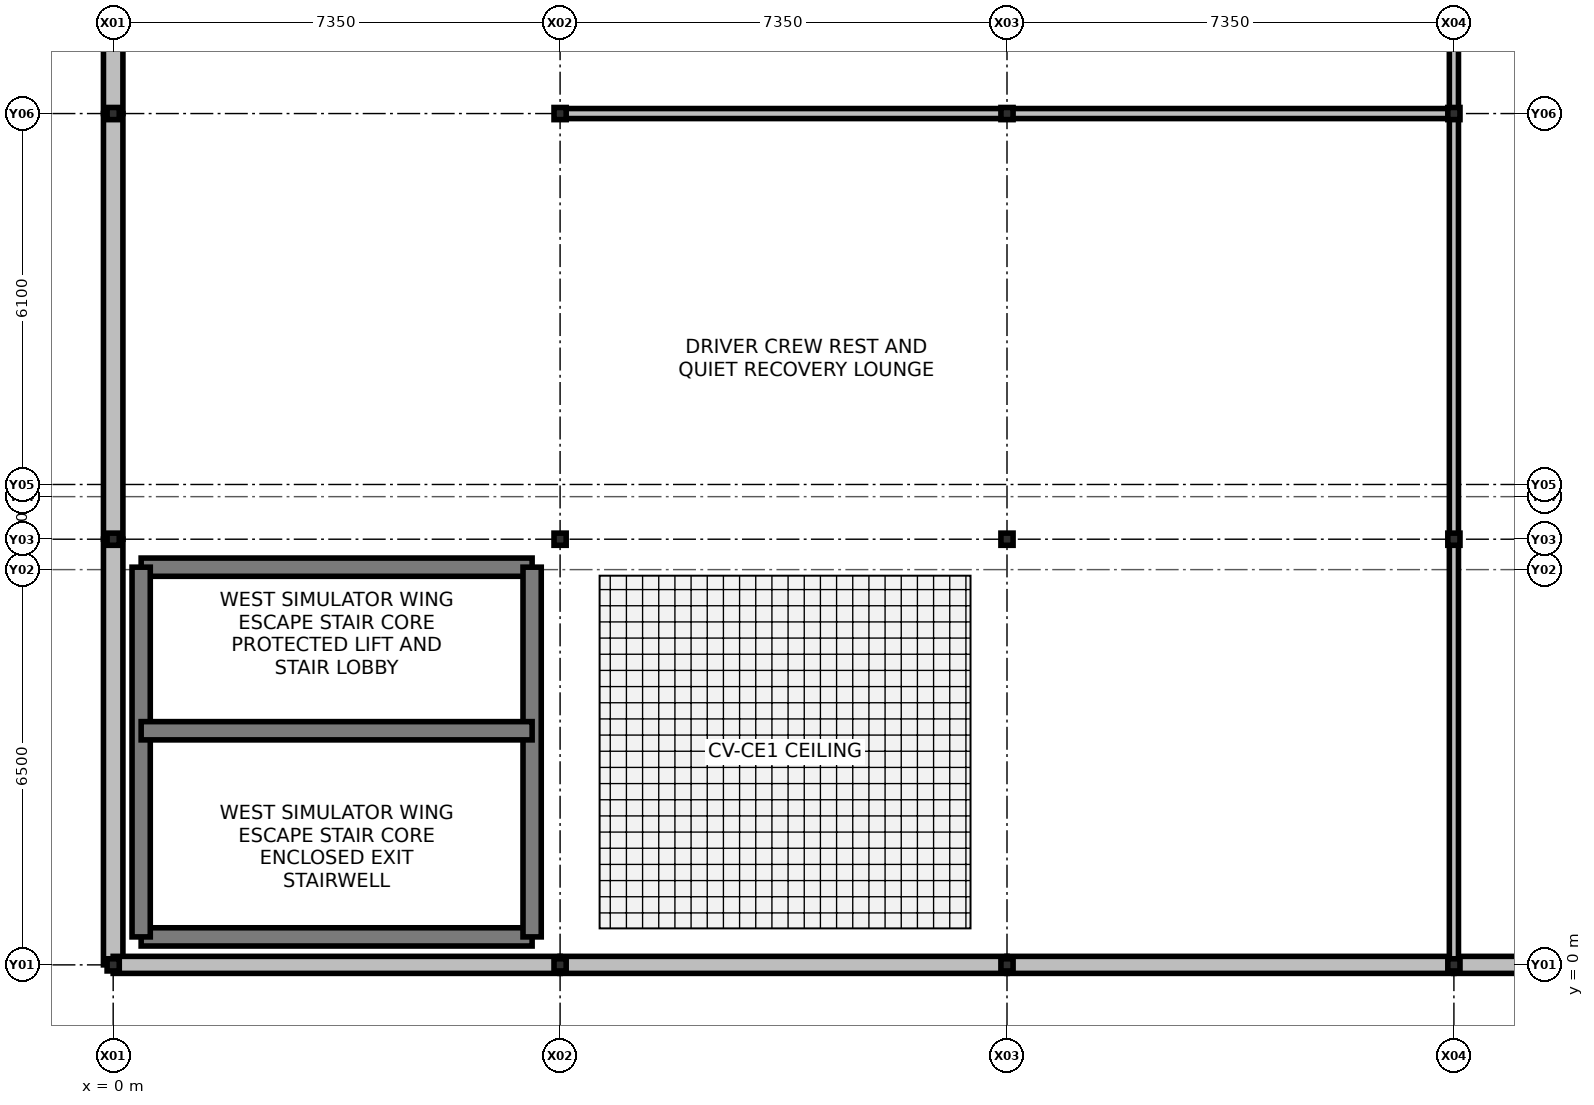
"""IFC4 building model, lengths in metres.
Left out: names, types, materials, properties, quantities, classifications, styles, units other than length and angle.
Written with IfcOpenShell. Run it as: python <this file> out.ifc"""

import sys

from ifc_helpers import new_model, si_unit, direction, frame, frame_2d, origin, origin_with_axes, origin_2d, place, context, subcontext, project, spatial, rectangle, i_section, extrude, element, fill, save


model = new_model("IFC4")
c1 = context("Model", 3, precision=1e-05, world=origin(), true_north=direction((0.0, 1.0)))
c2 = subcontext(c1, "Body", "Model", "MODEL_VIEW")
j1 = project(units=[si_unit("LENGTHUNIT", "METRE"), si_unit("PLANEANGLEUNIT", "RADIAN")], contexts=[c1])
p1 = place(None, origin())
s1 = spatial("IfcSite", under=j1, at=p1, CompositionType="ELEMENT")
p2 = place(p1, origin())
s2 = spatial("IfcBuilding", under=s1, at=p2, CompositionType="ELEMENT")
p3 = place(p2, frame((0.0, 0.0, 19.5)))
s3 = spatial("IfcBuildingStorey", under=s2, at=p3, CompositionType="ELEMENT", Elevation=19.5)
for number, where, z_axis, x_axis in (
    (1, (0.0, 0.0, 0.0), (0.0, 0.0, 1.0), (1.0, 0.0, 0.0)),
    (2, (0.0, 7.0, 0.0), (0.0, 0.0, 1.0), (1.0, 0.0, 0.0)),
    (3, (0.0, 14.0, 0.0), (0.0, 0.0, 1.0), (1.0, 0.0, 0.0)),
    (4, (7.35, 0.0, 0.0), (0.0, 0.0, 1.0), (1.0, 0.0, 0.0)),
    (5, (7.35, 7.0, 0.0), (0.0, 0.0, 1.0), (1.0, 0.0, 0.0)),
    (6, (7.35, 14.0, 0.0), (0.0, 0.0, 1.0), (1.0, 0.0, 0.0)),
    (7, (14.7, 0.0, 0.0), (0.0, 0.0, 1.0), (1.0, 0.0, 0.0)),
    (8, (14.7, 7.0, 0.0), (0.0, 0.0, 1.0), (1.0, 0.0, 0.0)),
    (9, (14.7, 14.0, 0.0), (0.0, 0.0, 1.0), (1.0, 0.0, 0.0)),
    (10, (22.05, 0.0, 0.0), (0.0, 0.0, 1.0), (1.0, 0.0, 0.0)),
    (11, (22.05, 7.0, 0.0), (0.0, 0.0, 1.0), (1.0, 0.0, 0.0)),
    (12, (22.05, 14.0, 0.0), (0.0, 0.0, 1.0), (1.0, 0.0, 0.0)),
):
    element("IfcColumn", number, at=place(p3, frame(where, z_axis=z_axis, x_axis=x_axis)), inside=s3, PredefinedType="COLUMN", context=c2, shape_type="SweptSolid", body=[
        extrude(i_section(OverallWidth=0.2, OverallDepth=0.2, WebThickness=0.008, FlangeThickness=0.012, at=origin_2d()), origin(), (0.0, 0.0, 1.0), 4.2),
    ])
p4 = place(p3, frame((0.0, 0.0, 0.0), z_axis=(0.0, 0.0, 1.0), x_axis=(0.0, 1.0, 0.0)))
e13 = element("IfcWall", 13, at=p4, inside=s3, PredefinedType="SOLIDWALL", context=c2, shape_type="SweptSolid", body=[
    extrude(rectangle(XDim=7.0, YDim=0.32, at=frame_2d((3.5, 0.0))), origin(), (0.0, 0.0, 1.0), 3.48),
])
p5 = place(p4, frame((2.2, 0.0, 0.9)))
e14 = element("IfcOpeningElement", 14, at=p5, cuts=e13, PredefinedType="OPENING", context=c2, shape_type="SweptSolid", body=[
    extrude(rectangle(XDim=2.55, YDim=1.75, at=frame_2d((1.275, 0.875))), frame((0.0, 0.17, 0.0), z_axis=(0.0, -1.0, 0.0), x_axis=(1.0, 0.0, 0.0)), (0.0, 0.0, 1.0), 0.34),
])
p6 = place(p3, frame((0.0, 7.0, 0.0), z_axis=(0.0, 0.0, 1.0), x_axis=(0.0, 1.0, 0.0)))
e15 = element("IfcWall", 15, at=p6, inside=s3, PredefinedType="SOLIDWALL", context=c2, shape_type="SweptSolid", body=[
    extrude(rectangle(XDim=7.0, YDim=0.32, at=frame_2d((3.5, 0.0))), origin(), (0.0, 0.0, 1.0), 3.48),
])
p7 = place(p6, frame((2.2, 0.0, 0.9)))
e16 = element("IfcOpeningElement", 16, at=p7, cuts=e15, PredefinedType="OPENING", context=c2, shape_type="SweptSolid", body=[
    extrude(rectangle(XDim=3.3, YDim=2.1, at=frame_2d((1.65, 1.05))), frame((0.0, 0.17, 0.0), z_axis=(0.0, -1.0, 0.0), x_axis=(1.0, 0.0, 0.0)), (0.0, 0.0, 1.0), 0.34),
])
p8 = place(p3, frame((0.0, 14.0, 0.0), z_axis=(0.0, 0.0, 1.0), x_axis=(0.0, 1.0, 0.0)))
e17 = element("IfcWall", 17, at=p8, inside=s3, PredefinedType="SOLIDWALL", context=c2, shape_type="SweptSolid", body=[
    extrude(rectangle(XDim=7.0, YDim=0.32, at=frame_2d((3.5, 0.0))), origin(), (0.0, 0.0, 1.0), 3.48),
])
p9 = place(p8, frame((2.2, 0.0, 0.9)))
e18 = element("IfcOpeningElement", 18, at=p9, cuts=e17, PredefinedType="OPENING", context=c2, shape_type="SweptSolid", body=[
    extrude(rectangle(XDim=1.5, YDim=1.8, at=frame_2d((0.75, 0.9))), frame((0.0, 0.17, 0.0), z_axis=(0.0, -1.0, 0.0), x_axis=(1.0, 0.0, 0.0)), (0.0, 0.0, 1.0), 0.34),
])
p10 = place(p3, origin_with_axes())
e19 = element("IfcWall", 19, at=p10, inside=s3, PredefinedType="SOLIDWALL", context=c2, shape_type="SweptSolid", body=[
    extrude(rectangle(XDim=7.35, YDim=0.28, at=frame_2d((3.675, 0.0))), origin(), (0.0, 0.0, 1.0), 3.48),
])
p11 = place(p10, frame((2.4, 0.0, 0.9)))
e20 = element("IfcOpeningElement", 20, at=p11, cuts=e19, PredefinedType="OPENING", context=c2, shape_type="SweptSolid", body=[
    extrude(rectangle(XDim=2.6, YDim=2.0, at=frame_2d((1.3, 1.0))), frame((0.0, 0.15, 0.0), z_axis=(0.0, -1.0, 0.0), x_axis=(1.0, 0.0, 0.0)), (0.0, 0.0, 1.0), 0.3),
])
p12 = place(p3, frame((7.35, 0.0, 0.0), z_axis=(0.0, 0.0, 1.0), x_axis=(1.0, 0.0, 0.0)))
e21 = element("IfcWall", 21, at=p12, inside=s3, PredefinedType="SOLIDWALL", context=c2, shape_type="SweptSolid", body=[
    extrude(rectangle(XDim=7.35, YDim=0.28, at=frame_2d((3.675, 0.0))), origin(), (0.0, 0.0, 1.0), 3.48),
])
p13 = place(p12, frame((2.4, 0.0, 0.9)))
e22 = element("IfcOpeningElement", 22, at=p13, cuts=e21, PredefinedType="OPENING", context=c2, shape_type="SweptSolid", body=[
    extrude(rectangle(XDim=2.8, YDim=2.1, at=frame_2d((1.4, 1.05))), frame((0.0, 0.15, 0.0), z_axis=(0.0, -1.0, 0.0), x_axis=(1.0, 0.0, 0.0)), (0.0, 0.0, 1.0), 0.3),
])
p14 = place(p3, frame((14.7, 0.0, 0.0), z_axis=(0.0, 0.0, 1.0), x_axis=(1.0, 0.0, 0.0)))
e23 = element("IfcWall", 23, at=p14, inside=s3, PredefinedType="SOLIDWALL", context=c2, shape_type="SweptSolid", body=[
    extrude(rectangle(XDim=7.35, YDim=0.28, at=frame_2d((3.675, 0.0))), origin(), (0.0, 0.0, 1.0), 3.48),
])
p15 = place(p14, frame((2.4, 0.0, 0.9)))
e24 = element("IfcOpeningElement", 24, at=p15, cuts=e23, PredefinedType="OPENING", context=c2, shape_type="SweptSolid", body=[
    extrude(rectangle(XDim=3.0, YDim=1.8, at=frame_2d((1.5, 0.9))), frame((0.0, 0.15, 0.0), z_axis=(0.0, -1.0, 0.0), x_axis=(1.0, 0.0, 0.0)), (0.0, 0.0, 1.0), 0.3),
])
p16 = place(p3, frame((22.05, 0.0, 0.0), z_axis=(0.0, 0.0, 1.0), x_axis=(1.0, 0.0, 0.0)))
e25 = element("IfcWall", 25, at=p16, inside=s3, PredefinedType="SOLIDWALL", context=c2, shape_type="SweptSolid", body=[
    extrude(rectangle(XDim=7.35, YDim=0.28, at=frame_2d((3.675, 0.0))), origin(), (0.0, 0.0, 1.0), 3.48),
])
p17 = place(p16, frame((2.4, 0.0, 0.9)))
e26 = element("IfcOpeningElement", 26, at=p17, cuts=e25, PredefinedType="OPENING", context=c2, shape_type="SweptSolid", body=[
    extrude(rectangle(XDim=3.0, YDim=2.2, at=frame_2d((1.5, 1.1))), frame((0.0, 0.15, 0.0), z_axis=(0.0, -1.0, 0.0), x_axis=(1.0, 0.0, 0.0)), (0.0, 0.0, 1.0), 0.3),
])
p18 = place(p3, frame((0.46, 0.46, 0.0), z_axis=(0.0, 0.0, 1.0), x_axis=(1.0, 0.0, 0.0)))
e27 = element("IfcWall", 27, at=p18, inside=s3, PredefinedType="SHEAR", context=c2, shape_type="SweptSolid", body=[
    extrude(rectangle(XDim=6.43, YDim=0.3, at=frame_2d((3.215, 0.0))), origin(), (0.0, 0.0, 1.0), 3.92),
])
p19 = place(p3, frame((0.46, 6.54, 0.0), z_axis=(0.0, 0.0, 1.0), x_axis=(1.0, 0.0, 0.0)))
e28 = element("IfcWall", 28, at=p19, inside=s3, PredefinedType="SHEAR", context=c2, shape_type="SweptSolid", body=[
    extrude(rectangle(XDim=6.43, YDim=0.3, at=frame_2d((3.215, 0.0))), origin(), (0.0, 0.0, 1.0), 3.92),
])
p20 = place(p19, frame((0.55, 0.0, 0.0)))
e29 = element("IfcOpeningElement", 29, at=p20, cuts=e28, PredefinedType="OPENING", context=c2, shape_type="SweptSolid", body=[
    extrude(rectangle(XDim=1.5, YDim=2.2, at=frame_2d((0.75, 1.1))), frame((0.0, 0.16, 0.0), z_axis=(0.0, -1.0, 0.0), x_axis=(1.0, 0.0, 0.0)), (0.0, 0.0, 1.0), 0.32),
])
for number, where, z_axis, x_axis in (
    (30, (0.46, 0.46, 0.0), (0.0, 0.0, 1.0), (0.0, 1.0, 0.0)),
    (31, (6.89, 0.46, 0.0), (0.0, 0.0, 1.0), (0.0, 1.0, 0.0)),
):
    element("IfcWall", number, at=place(p3, frame(where, z_axis=z_axis, x_axis=x_axis)), inside=s3, PredefinedType="SHEAR", context=c2, shape_type="SweptSolid", body=[
        extrude(rectangle(XDim=6.08, YDim=0.3, at=frame_2d((3.04, 0.0))), origin(), (0.0, 0.0, 1.0), 3.92),
    ])
p21 = place(p3, frame((0.46, 3.85, 0.0), z_axis=(0.0, 0.0, 1.0), x_axis=(1.0, 0.0, 0.0)))
e32 = element("IfcWall", 32, at=p21, inside=s3, PredefinedType="SHEAR", context=c2, shape_type="SweptSolid", body=[
    extrude(rectangle(XDim=6.43, YDim=0.3, at=frame_2d((3.215, 0.0))), origin(), (0.0, 0.0, 1.0), 3.92),
])
p22 = place(p21, frame((0.185, 0.0, 0.0)))
e33 = element("IfcOpeningElement", 33, at=p22, cuts=e32, PredefinedType="OPENING", context=c2, shape_type="SweptSolid", body=[
    extrude(rectangle(XDim=1.05, YDim=2.15, at=frame_2d((0.525, 1.075))), frame((0.0, 0.16, 0.0), z_axis=(0.0, -1.0, 0.0), x_axis=(1.0, 0.0, 0.0)), (0.0, 0.0, 1.0), 0.32),
])
p23 = place(p3, frame((7.35, 14.0, 0.0), z_axis=(0.0, 0.0, 1.0), x_axis=(1.0, 0.0, 0.0)))
e34 = element("IfcWall", 34, at=p23, inside=s3, PredefinedType="PARTITIONING", context=c2, shape_type="SweptSolid", body=[
    extrude(rectangle(XDim=14.7, YDim=0.165, at=frame_2d((7.35, 0.0))), origin(), (0.0, 0.0, 1.0), 3.25),
])
p24 = place(p23, frame((4.0, 0.0, 0.0)))
e35 = element("IfcOpeningElement", 35, at=p24, cuts=e34, PredefinedType="OPENING", context=c2, shape_type="SweptSolid", body=[
    extrude(rectangle(XDim=1.05, YDim=2.1, at=frame_2d((0.525, 1.05))), frame((0.0, 0.092, 0.0), z_axis=(0.0, -1.0, 0.0), x_axis=(1.0, 0.0, 0.0)), (0.0, 0.0, 1.0), 0.185),
])
p25 = place(p3, frame((22.05, 0.0, 0.0), z_axis=(0.0, 0.0, 1.0), x_axis=(0.0, 1.0, 0.0)))
e36 = element("IfcWall", 36, at=p25, inside=s3, PredefinedType="PARTITIONING", context=c2, shape_type="SweptSolid", body=[
    extrude(rectangle(XDim=28.0, YDim=0.15, at=frame_2d((14.0, 0.0))), origin(), (0.0, 0.0, 1.0), 3.25),
])
p26 = place(p25, frame((4.0, 0.0, 0.0)))
e37 = element("IfcOpeningElement", 37, at=p26, cuts=e36, PredefinedType="OPENING", context=c2, shape_type="SweptSolid", body=[
    extrude(rectangle(XDim=1.2, YDim=2.1, at=frame_2d((0.6, 1.05))), frame((0.0, 0.085, 0.0), z_axis=(0.0, -1.0, 0.0), x_axis=(1.0, 0.0, 0.0)), (0.0, 0.0, 1.0), 0.17),
])
p27 = place(p25, frame((24.0, 0.0, 0.0)))
e38 = element("IfcOpeningElement", 38, at=p27, cuts=e36, PredefinedType="OPENING", context=c2, shape_type="SweptSolid", body=[
    extrude(rectangle(XDim=1.1, YDim=2.1, at=frame_2d((0.55, 1.05))), frame((0.0, 0.085, 0.0), z_axis=(0.0, -1.0, 0.0), x_axis=(1.0, 0.0, 0.0)), (0.0, 0.0, 1.0), 0.17),
])
p28 = place(p5, origin())
e39 = element("IfcWindow", 39, at=p28, inside=s3, PartitioningType="SINGLE_PANEL", PredefinedType="WINDOW", context=c2, shape_type="SweptSolid", body=[
    extrude(rectangle(XDim=2.55, YDim=1.75, at=frame_2d((1.275, 0.875))), frame((0.0, 0.03, 0.0), z_axis=(0.0, -1.0, 0.0), x_axis=(1.0, 0.0, 0.0)), (0.0, 0.0, 1.0), 0.06),
])
fill(e14, e39)
p29 = place(p7, origin())
e40 = element("IfcWindow", 40, at=p29, inside=s3, PartitioningType="SINGLE_PANEL", PredefinedType="WINDOW", context=c2, shape_type="SweptSolid", body=[
    extrude(rectangle(XDim=3.3, YDim=2.1, at=frame_2d((1.65, 1.05))), frame((0.0, 0.03, 0.0), z_axis=(0.0, -1.0, 0.0), x_axis=(1.0, 0.0, 0.0)), (0.0, 0.0, 1.0), 0.06),
])
fill(e16, e40)
p30 = place(p11, origin())
e41 = element("IfcWindow", 41, at=p30, inside=s3, PartitioningType="SINGLE_PANEL", PredefinedType="WINDOW", context=c2, shape_type="SweptSolid", body=[
    extrude(rectangle(XDim=2.6, YDim=2.0, at=frame_2d((1.3, 1.0))), frame((0.0, 0.03, 0.0), z_axis=(0.0, -1.0, 0.0), x_axis=(1.0, 0.0, 0.0)), (0.0, 0.0, 1.0), 0.06),
])
fill(e20, e41)
p31 = place(p13, origin())
e42 = element("IfcWindow", 42, at=p31, inside=s3, PartitioningType="SINGLE_PANEL", PredefinedType="WINDOW", context=c2, shape_type="SweptSolid", body=[
    extrude(rectangle(XDim=2.8, YDim=2.1, at=frame_2d((1.4, 1.05))), frame((0.0, 0.03, 0.0), z_axis=(0.0, -1.0, 0.0), x_axis=(1.0, 0.0, 0.0)), (0.0, 0.0, 1.0), 0.06),
])
fill(e22, e42)
p32 = place(p15, origin())
e43 = element("IfcWindow", 43, at=p32, inside=s3, PartitioningType="SINGLE_PANEL", PredefinedType="WINDOW", context=c2, shape_type="SweptSolid", body=[
    extrude(rectangle(XDim=3.0, YDim=1.8, at=frame_2d((1.5, 0.9))), frame((0.0, 0.03, 0.0), z_axis=(0.0, -1.0, 0.0), x_axis=(1.0, 0.0, 0.0)), (0.0, 0.0, 1.0), 0.06),
])
fill(e24, e43)
p33 = place(p22, origin())
e44 = element("IfcDoor", 44, at=p33, inside=s3, OperationType="SINGLE_SWING_RIGHT", PredefinedType="DOOR", context=c2, shape_type="SweptSolid", body=[
    extrude(rectangle(XDim=1.05, YDim=2.15, at=frame_2d((0.525, 1.075))), frame((0.0, 0.025, 0.0), z_axis=(0.0, -1.0, 0.0), x_axis=(1.0, 0.0, 0.0)), (0.0, 0.0, 1.0), 0.05),
])
fill(e33, e44)
p34 = place(p20, origin())
e45 = element("IfcDoor", 45, at=p34, inside=s3, OperationType="DOUBLE_DOOR_SINGLE_SWING", PredefinedType="DOOR", context=c2, shape_type="SweptSolid", body=[
    extrude(rectangle(XDim=1.5, YDim=2.2, at=frame_2d((0.75, 1.1))), frame((0.0, 0.025, 0.0), z_axis=(0.0, -1.0, 0.0), x_axis=(1.0, 0.0, 0.0)), (0.0, 0.0, 1.0), 0.05),
])
fill(e29, e45)
p35 = place(p24, origin())
e46 = element("IfcDoor", 46, at=p35, inside=s3, OperationType="SINGLE_SWING_RIGHT", PredefinedType="DOOR", context=c2, shape_type="SweptSolid", body=[
    extrude(rectangle(XDim=1.05, YDim=2.1, at=frame_2d((0.525, 1.05))), frame((0.0, 0.025, 0.0), z_axis=(0.0, -1.0, 0.0), x_axis=(1.0, 0.0, 0.0)), (0.0, 0.0, 1.0), 0.05),
])
fill(e35, e46)
p36 = place(p26, origin())
e47 = element("IfcDoor", 47, at=p36, inside=s3, OperationType="SINGLE_SWING_LEFT", PredefinedType="DOOR", context=c2, shape_type="SweptSolid", body=[
    extrude(rectangle(XDim=1.2, YDim=2.1, at=frame_2d((0.6, 1.05))), frame((0.0, 0.025, 0.0), z_axis=(0.0, -1.0, 0.0), x_axis=(1.0, 0.0, 0.0)), (0.0, 0.0, 1.0), 0.05),
])
fill(e37, e47)
save(model, sys.argv[1])
